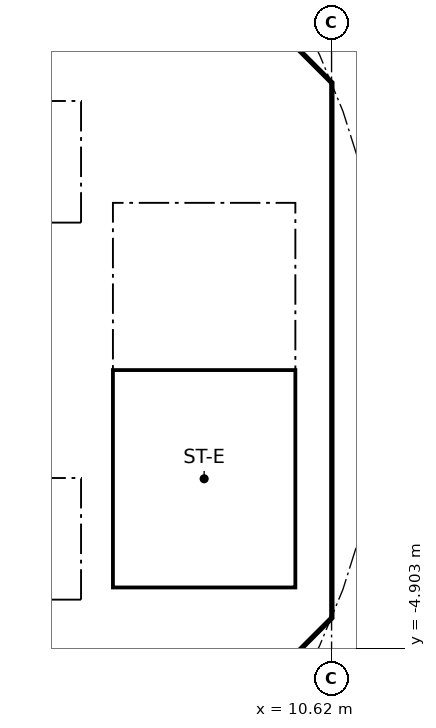
"""IFC4 building model, lengths in metres.
Left out: names, types, materials, properties, quantities, classifications, styles, units other than length and angle.
Written with IfcOpenShell. Run it as: python <this file> out.ifc"""

import sys

from ifc_helpers import new_model, si_unit, direction, frame, frame_2d, origin, place, context, subcontext, project, spatial, polyline, rectangle, outline, extrude, element, fill, save


model = new_model("IFC4")
c1 = context("Model", 3, precision=1e-05, world=origin(), true_north=direction((0.0, 1.0)))
c2 = subcontext(c1, "Body", "Model", "MODEL_VIEW")
j1 = project(units=[si_unit("LENGTHUNIT", "METRE"), si_unit("PLANEANGLEUNIT", "RADIAN")], contexts=[c1])
p1 = place(None, origin())
s1 = spatial("IfcSite", under=j1, at=p1, CompositionType="ELEMENT")
p2 = place(p1, origin())
s2 = spatial("IfcBuilding", under=s1, at=p2, CompositionType="ELEMENT")
p3 = place(p2, frame((0.0, 0.0, 227.0)))
s3 = spatial("IfcBuildingStorey", under=s2, at=p3, CompositionType="ELEMENT", Elevation=227.0)
p4 = place(p3, frame((9.988, 4.613, 0.0), z_axis=(0.0, 0.0, 1.0), x_axis=(-0.707106781187, 0.707106781187, 0.0)))
e1 = element("IfcWall", 1, at=p4, inside=s3, PredefinedType="SHEAR", context=c2, shape_type="SweptSolid", body=[
    extrude(rectangle(XDim=7.602, YDim=0.6, at=frame_2d((3.801, 0.0))), origin(), (0.0, 0.0, 1.0), 3.44),
])
p5 = place(p4, frame((3.201, 0.0, 0.0)))
e2 = element("IfcOpeningElement", 2, at=p5, cuts=e1, PredefinedType="OPENING", context=c2, shape_type="SweptSolid", body=[
    extrude(rectangle(XDim=1.2, YDim=2.1, at=frame_2d((0.6, 1.05))), frame((0.0, 0.31, 0.0), z_axis=(0.0, -1.0, 0.0), x_axis=(1.0, 0.0, 0.0)), (0.0, 0.0, 1.0), 0.62),
])
p6 = place(p3, frame((4.613, -9.988, 0.0), z_axis=(0.0, 0.0, 1.0), x_axis=(0.707106781187, 0.707106781187, 0.0)))
e3 = element("IfcWall", 3, at=p6, inside=s3, PredefinedType="SHEAR", context=c2, shape_type="SweptSolid", body=[
    extrude(rectangle(XDim=7.602, YDim=0.6, at=frame_2d((3.801, 0.0))), origin(), (0.0, 0.0, 1.0), 3.44),
])
p7 = place(p6, frame((3.201, 0.0, 0.0)))
e4 = element("IfcOpeningElement", 4, at=p7, cuts=e3, PredefinedType="OPENING", context=c2, shape_type="SweptSolid", body=[
    extrude(rectangle(XDim=1.2, YDim=2.1, at=frame_2d((0.6, 1.05))), frame((0.0, 0.31, 0.0), z_axis=(0.0, -1.0, 0.0), x_axis=(1.0, 0.0, 0.0)), (0.0, 0.0, 1.0), 0.62),
])
p8 = place(p3, frame((-6.7, 2.0, 0.0), z_axis=(0.0, 0.0, 1.0), x_axis=(1.0, 0.0, 0.0)))
e5 = element("IfcWall", 5, at=p8, inside=s3, PredefinedType="SOLIDWALL", context=c2, shape_type="SweptSolid", body=[
    extrude(rectangle(XDim=13.4, YDim=0.2, at=frame_2d((6.7, 0.0))), origin(), (0.0, 0.0, 1.0), 3.44),
])
p9 = place(p8, frame((7.25, 0.0, 0.0)))
e6 = element("IfcOpeningElement", 6, at=p9, cuts=e5, PredefinedType="OPENING", context=c2, shape_type="SweptSolid", body=[
    extrude(rectangle(XDim=1.1, YDim=2.1, at=frame_2d((0.55, 1.05))), frame((0.0, 0.11, 0.0), z_axis=(0.0, -1.0, 0.0), x_axis=(1.0, 0.0, 0.0)), (0.0, 0.0, 1.0), 0.22),
])
p10 = place(p8, frame((9.45, 0.0, 0.0)))
e7 = element("IfcOpeningElement", 7, at=p10, cuts=e5, PredefinedType="OPENING", context=c2, shape_type="SweptSolid", body=[
    extrude(rectangle(XDim=1.1, YDim=2.1, at=frame_2d((0.55, 1.05))), frame((0.0, 0.11, 0.0), z_axis=(0.0, -1.0, 0.0), x_axis=(1.0, 0.0, 0.0)), (0.0, 0.0, 1.0), 0.22),
])
p11 = place(p8, frame((1.85, 0.0, 0.0)))
e8 = element("IfcOpeningElement", 8, at=p11, cuts=e5, PredefinedType="OPENING", context=c2, shape_type="SweptSolid", body=[
    extrude(rectangle(XDim=0.9, YDim=2.1, at=frame_2d((0.45, 1.05))), frame((0.0, 0.11, 0.0), z_axis=(0.0, -1.0, 0.0), x_axis=(1.0, 0.0, 0.0)), (0.0, 0.0, 1.0), 0.22),
])
p12 = place(p8, frame((5.15, 0.0, 0.0)))
e9 = element("IfcOpeningElement", 9, at=p12, cuts=e5, PredefinedType="OPENING", context=c2, shape_type="SweptSolid", body=[
    extrude(rectangle(XDim=0.9, YDim=2.1, at=frame_2d((0.45, 1.05))), frame((0.0, 0.11, 0.0), z_axis=(0.0, -1.0, 0.0), x_axis=(1.0, 0.0, 0.0)), (0.0, 0.0, 1.0), 0.22),
])
p13 = place(p3, frame((6.7, 4.0, 0.0), z_axis=(0.0, 0.0, 1.0), x_axis=(1.0, 0.0, 0.0)))
e10 = element("IfcWall", 10, at=p13, inside=s3, PredefinedType="SOLIDWALL", context=c2, shape_type="SweptSolid", body=[
    extrude(rectangle(XDim=3.325, YDim=0.2, at=frame_2d((1.662, 0.0))), origin(), (0.0, 0.0, 1.0), 3.44),
])
p14 = place(p13, frame((1.25, 0.0, 0.0)))
e11 = element("IfcOpeningElement", 11, at=p14, cuts=e10, PredefinedType="OPENING", context=c2, shape_type="SweptSolid", body=[
    extrude(rectangle(XDim=1.1, YDim=2.1, at=frame_2d((0.55, 1.05))), frame((0.0, 0.11, 0.0), z_axis=(0.0, -1.0, 0.0), x_axis=(1.0, 0.0, 0.0)), (0.0, 0.0, 1.0), 0.22),
])
p15 = place(p3, frame((-6.7, -2.0, 0.0), z_axis=(0.0, 0.0, 1.0), x_axis=(1.0, 0.0, 0.0)))
e12 = element("IfcWall", 12, at=p15, inside=s3, PredefinedType="SOLIDWALL", context=c2, shape_type="SweptSolid", body=[
    extrude(rectangle(XDim=13.4, YDim=0.2, at=frame_2d((6.7, 0.0))), origin(), (0.0, 0.0, 1.0), 3.44),
])
p16 = place(p15, frame((5.05, 0.0, 0.0)))
e13 = element("IfcOpeningElement", 13, at=p16, cuts=e12, PredefinedType="OPENING", context=c2, shape_type="SweptSolid", body=[
    extrude(rectangle(XDim=1.1, YDim=2.1, at=frame_2d((0.55, 1.05))), frame((0.0, 0.11, 0.0), z_axis=(0.0, -1.0, 0.0), x_axis=(1.0, 0.0, 0.0)), (0.0, 0.0, 1.0), 0.22),
])
p17 = place(p15, frame((7.25, 0.0, 0.0)))
e14 = element("IfcOpeningElement", 14, at=p17, cuts=e12, PredefinedType="OPENING", context=c2, shape_type="SweptSolid", body=[
    extrude(rectangle(XDim=1.1, YDim=2.1, at=frame_2d((0.55, 1.05))), frame((0.0, 0.11, 0.0), z_axis=(0.0, -1.0, 0.0), x_axis=(1.0, 0.0, 0.0)), (0.0, 0.0, 1.0), 0.22),
])
p18 = place(p15, frame((1.85, 0.0, 0.0)))
e15 = element("IfcOpeningElement", 15, at=p18, cuts=e12, PredefinedType="OPENING", context=c2, shape_type="SweptSolid", body=[
    extrude(rectangle(XDim=0.9, YDim=2.1, at=frame_2d((0.45, 1.05))), frame((0.0, 0.11, 0.0), z_axis=(0.0, -1.0, 0.0), x_axis=(1.0, 0.0, 0.0)), (0.0, 0.0, 1.0), 0.22),
])
p19 = place(p3, origin())
e16 = element("IfcWall", 16, at=p19, inside=s3, PredefinedType="SHEAR", context=c2, shape_type="SweptSolid", body=[
    extrude(outline(polyline([(9.776, -4.401), (10.025, -4.152), (10.025, -3.801), (10.025, 4.152), (9.776, 4.401), (10.2, 4.825), (10.625, 4.401), (10.625, -4.401), (10.2, -4.825), (9.776, -4.401)])), origin(), (0.0, 0.0, 1.0), 3.44),
])
p20 = place(p3, origin())
e17 = element("IfcWall", 17, at=p20, inside=s3, PredefinedType="SOLIDWALL", context=c2, shape_type="SweptSolid", body=[
    extrude(outline(polyline([(-6.7, -2.1), (-6.5, -2.1), (-6.5, -4.1), (-2.3, -4.1), (-2.3, -2.1), (-2.1, -2.1), (-2.1, -4.1), (-0.1, -4.1), (-0.1, -2.1), (0.1, -2.1), (0.1, -4.1), (2.1, -4.1), (2.1, -2.1), (2.3, -2.1), (2.3, -4.1), (4.3, -4.1), (4.3, -2.1), (4.5, -2.1), (4.5, -4.1), (6.5, -4.1), (6.5, -2.1), (6.7, -2.1), (6.7, -4.3), (-6.7, -4.3), (-6.7, -2.1)])), origin(), (0.0, 0.0, 1.0), 3.44),
])
p21 = place(p3, origin())
e18 = element("IfcWall", 18, at=p21, inside=s3, PredefinedType="SOLIDWALL", context=c2, shape_type="SweptSolid", body=[
    extrude(outline(polyline([(-6.7, 4.3), (6.7, 4.3), (6.7, 2.1), (6.5, 2.1), (6.5, 4.1), (4.5, 4.1), (4.5, 2.1), (4.3, 2.1), (4.3, 4.1), (2.3, 4.1), (2.3, 2.1), (2.1, 2.1), (2.1, 4.1), (0.1, 4.1), (0.1, 2.1), (-0.1, 2.1), (-0.1, 4.1), (-2.1, 4.1), (-2.1, 2.1), (-2.3, 2.1), (-2.3, 4.1), (-6.5, 4.1), (-6.5, 2.1), (-6.7, 2.1), (-6.7, 4.3)])), origin(), (0.0, 0.0, 1.0), 3.44),
])
p22 = place(p3, origin())
e19 = element("IfcWall", 19, at=p22, inside=s3, PredefinedType="SOLIDWALL", context=c2, shape_type="SweptSolid", body=[
    extrude(outline(polyline([(7.025, -3.9), (6.7, -3.9), (6.7, 3.9), (7.025, 3.9), (7.025, -3.9)])), origin(), (0.0, 0.0, 1.0), 3.44),
])
p23 = place(p3, origin())
e20 = element("IfcWall", 20, at=p23, inside=s3, PredefinedType="SOLIDWALL", context=c2, shape_type="SweptSolid", body=[
    extrude(outline(polyline([(10.025, -4.1), (6.7, -4.1), (6.7, -3.9), (10.025, -3.9), (10.025, -4.1)])), origin(), (0.0, 0.0, 1.0), 3.44),
])
p24 = place(p14, frame((1.1, 0.0, 0.0), x_axis=(-1.0, 0.0, 0.0)))
e21 = element("IfcDoor", 21, at=p24, inside=s3, OperationType="SINGLE_SWING_LEFT", PredefinedType="DOOR", context=c2, shape_type="SweptSolid", body=[
    extrude(rectangle(XDim=1.1, YDim=2.1, at=frame_2d((0.55, 1.05))), frame((0.0, 0.025, 0.0), z_axis=(0.0, -1.0, 0.0), x_axis=(1.0, 0.0, 0.0)), (0.0, 0.0, 1.0), 0.05),
])
fill(e11, e21)
save(model, sys.argv[1])
